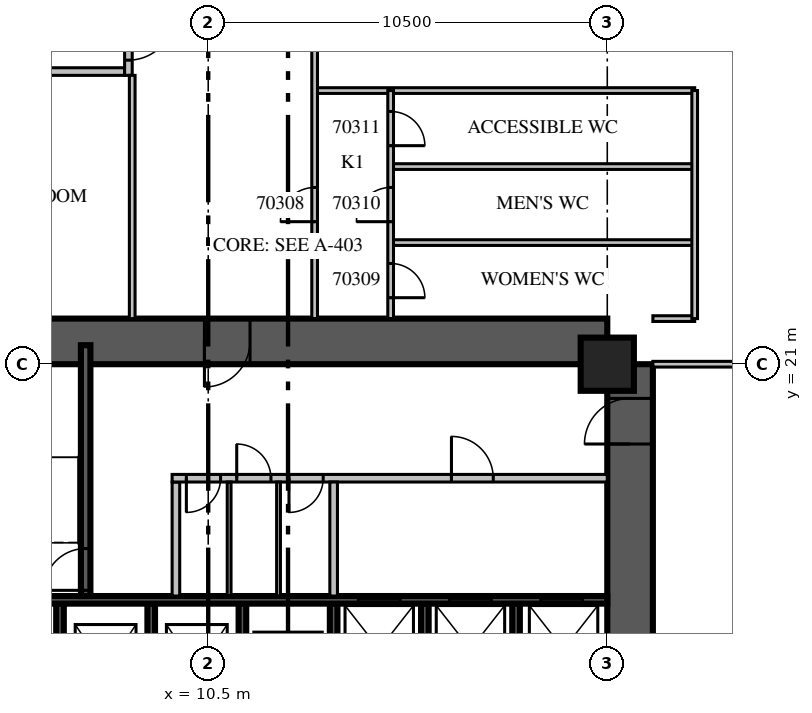
"""IFC4 building model, lengths in metres.
Left out: names, types, materials, properties, quantities, classifications, styles, units other than length and angle.
Written with IfcOpenShell. Run it as: python <this file> out.ifc"""

import sys

from ifc_helpers import new_model, si_unit, direction, frame, frame_2d, origin, origin_2d, place, context, subcontext, project, spatial, rectangle, extrude, source, transform, mapped, element, fill, save


model = new_model("IFC4")
c1 = context("Model", 3, precision=1e-05, world=origin(), true_north=direction((0.0, 1.0)))
c2 = subcontext(c1, "Body", "Model", "MODEL_VIEW")
j1 = project(units=[si_unit("LENGTHUNIT", "METRE"), si_unit("PLANEANGLEUNIT", "RADIAN")], contexts=[c1])
p1 = place(None, origin())
s1 = spatial("IfcSite", under=j1, at=p1, CompositionType="ELEMENT")
p2 = place(p1, origin())
s2 = spatial("IfcBuilding", under=s1, at=p2, CompositionType="ELEMENT")
p3 = place(p2, origin())
s3 = spatial("IfcBuildingStorey", under=s2, at=p3, CompositionType="ELEMENT", Elevation=0.0)
m1 = source(origin(), c2, "Body", "SweptSolid", [
    extrude(rectangle(XDim=1.4, YDim=1.4, at=origin_2d()), origin(), (0.0, 0.0, 1.0), 7.5),
])
p4 = place(p3, frame((21.0, 21.0, 0.0), z_axis=(0.0, 0.0, 1.0), x_axis=(1.0, 0.0, 0.0)))
e1 = element("IfcColumn", 1, at=p4, inside=s3, PredefinedType="COLUMN", context=c2, shape_type="MappedRepresentation", body=[
    mapped(m1, transform((0.0, 0.0, 0.0), scale=1.0)),
])
p5 = place(p3, frame((21.6, 4.2, 0.0), z_axis=(0.0, 0.0, 1.0), x_axis=(0.0, 1.0, 0.0)))
e2 = element("IfcWall", 2, at=p5, inside=s3, PredefinedType="SHEAR", context=c2, shape_type="SweptSolid", body=[
    extrude(rectangle(XDim=16.8, YDim=1.2, at=frame_2d((8.4, 0.0))), origin(), (0.0, 0.0, 1.0), 7.5),
])
m2 = source(origin(), c2, "Body", "SweptSolid", [
    extrude(rectangle(XDim=2.2, YDim=2.1, at=frame_2d((1.1, 1.05))), frame((0.0, 0.61, 0.0), z_axis=(0.0, -1.0, 0.0), x_axis=(1.0, 0.0, 0.0)), (0.0, 0.0, 1.0), 1.22),
])
p6 = place(p5, frame((4.2, 0.0, 0.0)))
e3 = element("IfcOpeningElement", 3, at=p6, cuts=e2, PredefinedType="OPENING", context=c2, shape_type="MappedRepresentation", body=[
    mapped(m2, transform((0.0, 0.0, 0.0), scale=1.0)),
])
m3 = source(origin(), c2, "Body", "SweptSolid", [
    extrude(rectangle(XDim=1.2, YDim=2.1, at=frame_2d((0.6, 1.05))), frame((0.0, 0.61, 0.0), z_axis=(0.0, -1.0, 0.0), x_axis=(1.0, 0.0, 0.0)), (0.0, 0.0, 1.0), 1.22),
])
p7 = place(p5, frame((14.7, 0.0, 0.0)))
e4 = element("IfcOpeningElement", 4, at=p7, cuts=e2, PredefinedType="OPENING", context=c2, shape_type="MappedRepresentation", body=[
    mapped(m3, transform((0.0, 0.0, 0.0), scale=1.0)),
])
m4 = source(origin(), c2, "Body", "SweptSolid", [
    extrude(rectangle(XDim=16.8, YDim=1.2, at=frame_2d((8.4, 0.0))), origin(), (0.0, 0.0, 1.0), 7.5),
])
p8 = place(p3, frame((4.2, 21.6, 0.0), z_axis=(0.0, 0.0, 1.0), x_axis=(1.0, 0.0, 0.0)))
e5 = element("IfcWall", 5, at=p8, inside=s3, PredefinedType="SHEAR", context=c2, shape_type="MappedRepresentation", body=[
    mapped(m4, transform((0.0, 0.0, 0.0), scale=1.0)),
])
p9 = place(p8, frame((6.2, 0.0, 0.0)))
e6 = element("IfcOpeningElement", 6, at=p9, cuts=e5, PredefinedType="OPENING", context=c2, shape_type="MappedRepresentation", body=[
    mapped(m3, transform((0.0, 0.0, 0.0), scale=1.0)),
])
p10 = place(p3, frame((6.6, 11.7, 0.0), z_axis=(0.0, 0.0, 1.0), x_axis=(0.0, 1.0, 0.0)))
e7 = element("IfcWall", 7, at=p10, inside=s3, PredefinedType="SOLIDWALL", context=c2, shape_type="SweptSolid", body=[
    extrude(rectangle(XDim=3.0, YDim=0.2, at=frame_2d((1.5, 0.0))), origin(), (0.0, 0.0, 1.0), 7.5),
])
m5 = source(origin(), c2, "Body", "SweptSolid", [
    extrude(rectangle(XDim=3.0, YDim=0.2, at=frame_2d((1.5, 0.0))), origin(), (0.0, 0.0, 1.0), 7.5),
])
for number, where, z_axis, x_axis in (
    (8, (9.0, 11.7, 0.0), (0.0, 0.0, 1.0), (0.0, 1.0, 0.0)),
    (9, (11.4, 11.7, 0.0), (0.0, 0.0, 1.0), (0.0, 1.0, 0.0)),
    (10, (13.8, 11.7, 0.0), (0.0, 0.0, 1.0), (0.0, 1.0, 0.0)),
    (11, (16.2, 11.7, 0.0), (0.0, 0.0, 1.0), (0.0, 1.0, 0.0)),
    (12, (18.6, 11.7, 0.0), (0.0, 0.0, 1.0), (0.0, 1.0, 0.0)),
):
    element("IfcWall", number, at=place(p3, frame(where, z_axis=z_axis, x_axis=x_axis)), inside=s3, PredefinedType="SOLIDWALL", context=c2, shape_type="MappedRepresentation", body=[
        mapped(m5, transform((0.0, 0.0, 0.0), scale=1.0)),
    ])
m6 = source(origin(), c2, "Body", "SweptSolid", [
    extrude(rectangle(XDim=16.8, YDim=0.2, at=frame_2d((8.4, 0.0))), origin(), (0.0, 0.0, 1.0), 7.5),
])
p11 = place(p3, frame((4.2, 14.8, 0.0), z_axis=(0.0, 0.0, 1.0), x_axis=(1.0, 0.0, 0.0)))
e13 = element("IfcWall", 13, at=p11, inside=s3, PredefinedType="SOLIDWALL", context=c2, shape_type="MappedRepresentation", body=[
    mapped(m6, transform((0.0, 0.0, 0.0), scale=1.0)),
])
m7 = source(origin(), c2, "Body", "SweptSolid", [
    extrude(rectangle(XDim=1.1, YDim=2.1, at=frame_2d((0.55, 1.05))), frame((0.0, 0.11, 0.0), z_axis=(0.0, -1.0, 0.0), x_axis=(1.0, 0.0, 0.0)), (0.0, 0.0, 1.0), 0.22),
])
p12 = place(p11, frame((10.25, 0.0, 0.0)))
e14 = element("IfcOpeningElement", 14, at=p12, cuts=e13, PredefinedType="OPENING", context=c2, shape_type="MappedRepresentation", body=[
    mapped(m7, transform((0.0, 0.0, 0.0), scale=1.0)),
])
p13 = place(p11, frame((12.65, 0.0, 0.0)))
e15 = element("IfcOpeningElement", 15, at=p13, cuts=e13, PredefinedType="OPENING", context=c2, shape_type="MappedRepresentation", body=[
    mapped(m7, transform((0.0, 0.0, 0.0), scale=1.0)),
])
p14 = place(p11, frame((15.05, 0.0, 0.0)))
e16 = element("IfcOpeningElement", 16, at=p14, cuts=e13, PredefinedType="OPENING", context=c2, shape_type="MappedRepresentation", body=[
    mapped(m7, transform((0.0, 0.0, 0.0), scale=1.0)),
])
p15 = place(p3, frame((7.275, 14.9, 0.0), z_axis=(0.0, 0.0, 1.0), x_axis=(0.0, 1.0, 0.0)))
e17 = element("IfcWall", 17, at=p15, inside=s3, PredefinedType="SOLIDWALL", context=c2, shape_type="SweptSolid", body=[
    extrude(rectangle(XDim=6.6, YDim=0.25, at=frame_2d((3.3, 0.0))), origin(), (0.0, 0.0, 1.0), 6.9),
])
m8 = source(origin(), c2, "Body", "SweptSolid", [
    extrude(rectangle(XDim=1.1, YDim=2.1, at=frame_2d((0.55, 1.05))), frame((0.0, 0.135, 0.0), z_axis=(0.0, -1.0, 0.0), x_axis=(1.0, 0.0, 0.0)), (0.0, 0.0, 1.0), 0.27),
])
p16 = place(p15, frame((0.15, 0.0, 0.0)))
e18 = element("IfcOpeningElement", 18, at=p16, cuts=e17, PredefinedType="OPENING", context=c2, shape_type="MappedRepresentation", body=[
    mapped(m8, transform((0.0, 0.0, 0.0), scale=1.0)),
])
p17 = place(p3, frame((9.65, 14.9, 0.0), z_axis=(0.0, 0.0, 1.0), x_axis=(0.0, 1.0, 0.0)))
e19 = element("IfcWall", 19, at=p17, inside=s3, PredefinedType="PARTITIONING", context=c2, shape_type="SweptSolid", body=[
    extrude(rectangle(XDim=3.0, YDim=0.2, at=frame_2d((1.5, 0.0))), origin(), (0.0, 0.0, 1.0), 6.9),
])
p18 = place(p3, frame((9.55, 18.0, 0.0), z_axis=(0.0, 0.0, 1.0), x_axis=(1.0, 0.0, 0.0)))
e20 = element("IfcWall", 20, at=p18, inside=s3, PredefinedType="PARTITIONING", context=c2, shape_type="SweptSolid", body=[
    extrude(rectangle(XDim=11.45, YDim=0.2, at=frame_2d((5.725, 0.0))), origin(), (0.0, 0.0, 1.0), 6.9),
])
m9 = source(origin(), c2, "Body", "SweptSolid", [
    extrude(rectangle(XDim=0.9, YDim=2.1, at=frame_2d((0.45, 1.05))), frame((0.0, 0.11, 0.0), z_axis=(0.0, -1.0, 0.0), x_axis=(1.0, 0.0, 0.0)), (0.0, 0.0, 1.0), 0.22),
])
p19 = place(p18, frame((0.375, 0.0, 0.0)))
e21 = element("IfcOpeningElement", 21, at=p19, cuts=e20, PredefinedType="OPENING", context=c2, shape_type="MappedRepresentation", body=[
    mapped(m9, transform((0.0, 0.0, 0.0), scale=1.0)),
])
p20 = place(p18, frame((1.7, 0.0, 0.0)))
e22 = element("IfcOpeningElement", 22, at=p20, cuts=e20, PredefinedType="OPENING", context=c2, shape_type="MappedRepresentation", body=[
    mapped(m9, transform((0.0, 0.0, 0.0), scale=1.0)),
])
p21 = place(p18, frame((3.075, 0.0, 0.0)))
e23 = element("IfcOpeningElement", 23, at=p21, cuts=e20, PredefinedType="OPENING", context=c2, shape_type="MappedRepresentation", body=[
    mapped(m9, transform((0.0, 0.0, 0.0), scale=1.0)),
])
p22 = place(p18, frame((7.35, 0.0, 0.0)))
e24 = element("IfcOpeningElement", 24, at=p22, cuts=e20, PredefinedType="OPENING", context=c2, shape_type="MappedRepresentation", body=[
    mapped(m7, transform((0.0, 0.0, 0.0), scale=1.0)),
])
m10 = source(origin(), c2, "Body", "SweptSolid", [
    extrude(rectangle(XDim=3.0, YDim=0.2, at=frame_2d((1.5, 0.0))), origin(), (0.0, 0.0, 1.0), 6.9),
])
p23 = place(p3, frame((13.8, 14.9, 0.0), z_axis=(0.0, 0.0, 1.0), x_axis=(0.0, 1.0, 0.0)))
e25 = element("IfcWall", 25, at=p23, inside=s3, PredefinedType="PARTITIONING", context=c2, shape_type="MappedRepresentation", body=[
    mapped(m10, transform((0.0, 0.0, 0.0), scale=1.0)),
])
p24 = place(p3, frame((11.05, 14.9, 0.0), z_axis=(0.0, 0.0, 1.0), x_axis=(0.0, 1.0, 0.0)))
e26 = element("IfcWall", 26, at=p24, inside=s3, PredefinedType="PARTITIONING", context=c2, shape_type="SweptSolid", body=[
    extrude(rectangle(XDim=3.0, YDim=0.1, at=frame_2d((1.5, 0.0))), origin(), (0.0, 0.0, 1.0), 6.9),
])
m11 = source(origin(), c2, "Body", "SweptSolid", [
    extrude(rectangle(XDim=3.0, YDim=0.1, at=frame_2d((1.5, 0.0))), origin(), (0.0, 0.0, 1.0), 6.9),
])
p25 = place(p3, frame((12.35, 14.9, 0.0), z_axis=(0.0, 0.0, 1.0), x_axis=(0.0, 1.0, 0.0)))
e27 = element("IfcWall", 27, at=p25, inside=s3, PredefinedType="PARTITIONING", context=c2, shape_type="MappedRepresentation", body=[
    mapped(m11, transform((0.0, 0.0, 0.0), scale=1.0)),
])
m12 = source(origin(), c2, "Body", "SweptSolid", [
    extrude(rectangle(XDim=8.0, YDim=0.2, at=frame_2d((4.0, 0.0))), origin(), (0.0, 0.0, 1.0), 6.9),
])
p26 = place(p3, frame((0.3, 28.7, 0.0), z_axis=(0.0, 0.0, 1.0), x_axis=(1.0, 0.0, 0.0)))
e28 = element("IfcWall", 28, at=p26, inside=s3, PredefinedType="PARTITIONING", context=c2, shape_type="MappedRepresentation", body=[
    mapped(m12, transform((0.0, 0.0, 0.0), scale=1.0)),
])
m13 = source(origin(), c2, "Body", "SweptSolid", [
    extrude(rectangle(XDim=5.45, YDim=0.2, at=frame_2d((2.725, 0.0))), origin(), (0.0, 0.0, 1.0), 6.9),
])
p27 = place(p3, frame((8.4, 34.05, 0.0), z_axis=(0.0, 0.0, 1.0), x_axis=(0.0, -1.0, 0.0)))
e29 = element("IfcWall", 29, at=p27, inside=s3, PredefinedType="PARTITIONING", context=c2, shape_type="MappedRepresentation", body=[
    mapped(m13, transform((0.0, 0.0, 0.0), scale=1.0)),
])
m14 = source(origin(), c2, "Body", "SweptSolid", [
    extrude(rectangle(XDim=1.2, YDim=2.1, at=frame_2d((0.6, 1.05))), frame((0.0, 0.11, 0.0), z_axis=(0.0, -1.0, 0.0), x_axis=(1.0, 0.0, 0.0)), (0.0, 0.0, 1.0), 0.22),
])
p28 = place(p27, frame((3.85, 0.0, 0.0)))
e30 = element("IfcOpeningElement", 30, at=p28, cuts=e29, PredefinedType="OPENING", context=c2, shape_type="MappedRepresentation", body=[
    mapped(m14, transform((0.0, 0.0, 0.0), scale=1.0)),
])
p29 = place(p27, frame((1.3, 0.0, 0.0)))
e31 = element("IfcOpeningElement", 31, at=p29, cuts=e29, PredefinedType="OPENING", context=c2, shape_type="MappedRepresentation", body=[
    mapped(m9, transform((0.0, 0.0, 0.0), scale=1.0)),
])
p30 = place(p3, frame((22.2, 21.0, 0.0), z_axis=(0.0, 0.0, 1.0), x_axis=(1.0, 0.0, 0.0)))
e32 = element("IfcWall", 32, at=p30, inside=s3, PredefinedType="PARTITIONING", context=c2, shape_type="SweptSolid", body=[
    extrude(rectangle(XDim=16.2, YDim=0.15, at=frame_2d((8.1, 0.0))), origin(), (0.0, 0.0, 1.0), 6.9),
])
p31 = place(p3, frame((22.2, 22.2, 0.0), z_axis=(0.0, 0.0, 1.0), x_axis=(1.0, 0.0, 0.0)))
e33 = element("IfcWall", 33, at=p31, inside=s3, PredefinedType="PARTITIONING", context=c2, shape_type="SweptSolid", body=[
    extrude(rectangle(XDim=1.1, YDim=0.15, at=frame_2d((0.55, 0.0))), origin(), (0.0, 0.0, 1.0), 6.9),
])
p32 = place(p3, frame((15.3, 24.2, 0.0), z_axis=(0.0, 0.0, 1.0), x_axis=(1.0, 0.0, 0.0)))
e34 = element("IfcWall", 34, at=p32, inside=s3, PredefinedType="PARTITIONING", context=c2, shape_type="SweptSolid", body=[
    extrude(rectangle(XDim=8.0, YDim=0.15, at=frame_2d((4.0, 0.0))), origin(), (0.0, 0.0, 1.0), 6.9),
])
m15 = source(origin(), c2, "Body", "SweptSolid", [
    extrude(rectangle(XDim=8.0, YDim=0.15, at=frame_2d((4.0, 0.0))), origin(), (0.0, 0.0, 1.0), 6.9),
])
p33 = place(p3, frame((15.3, 26.2, 0.0), z_axis=(0.0, 0.0, 1.0), x_axis=(1.0, 0.0, 0.0)))
e35 = element("IfcWall", 35, at=p33, inside=s3, PredefinedType="PARTITIONING", context=c2, shape_type="MappedRepresentation", body=[
    mapped(m15, transform((0.0, 0.0, 0.0), scale=1.0)),
])
p34 = place(p3, frame((13.3, 28.2, 0.0), z_axis=(0.0, 0.0, 1.0), x_axis=(1.0, 0.0, 0.0)))
e36 = element("IfcWall", 36, at=p34, inside=s3, PredefinedType="PARTITIONING", context=c2, shape_type="SweptSolid", body=[
    extrude(rectangle(XDim=10.0, YDim=0.15, at=frame_2d((5.0, 0.0))), origin(), (0.0, 0.0, 1.0), 6.9),
])
m16 = source(origin(), c2, "Body", "SweptSolid", [
    extrude(rectangle(XDim=6.4, YDim=0.15, at=frame_2d((3.2, 0.0))), origin(), (0.0, 0.0, 1.0), 6.9),
])
p35 = place(p3, frame((8.5, 22.2, 0.0), z_axis=(0.0, 0.0, 1.0), x_axis=(0.0, 1.0, 0.0)))
e37 = element("IfcWall", 37, at=p35, inside=s3, PredefinedType="PARTITIONING", context=c2, shape_type="MappedRepresentation", body=[
    mapped(m16, transform((0.0, 0.0, 0.0), scale=1.0)),
])
p36 = place(p3, frame((13.3, 22.2, 0.0), z_axis=(0.0, 0.0, 1.0), x_axis=(0.0, 1.0, 0.0)))
e38 = element("IfcWall", 38, at=p36, inside=s3, PredefinedType="PARTITIONING", context=c2, shape_type="SweptSolid", body=[
    extrude(rectangle(XDim=20.3, YDim=0.15, at=frame_2d((10.15, 0.0))), origin(), (0.0, 0.0, 1.0), 6.9),
])
m17 = source(origin(), c2, "Body", "SweptSolid", [
    extrude(rectangle(XDim=0.9, YDim=2.1, at=frame_2d((0.45, 1.05))), frame((0.0, 0.085, 0.0), z_axis=(0.0, -1.0, 0.0), x_axis=(1.0, 0.0, 0.0)), (0.0, 0.0, 1.0), 0.17),
])
p37 = place(p36, frame((2.55, 0.0, 0.0)))
e39 = element("IfcOpeningElement", 39, at=p37, cuts=e38, PredefinedType="OPENING", context=c2, shape_type="MappedRepresentation", body=[
    mapped(m17, transform((0.0, 0.0, 0.0), scale=1.0)),
])
p38 = place(p3, frame((15.3, 22.2, 0.0), z_axis=(0.0, 0.0, 1.0), x_axis=(0.0, 1.0, 0.0)))
e40 = element("IfcWall", 40, at=p38, inside=s3, PredefinedType="PARTITIONING", context=c2, shape_type="SweptSolid", body=[
    extrude(rectangle(XDim=6.0, YDim=0.15, at=frame_2d((3.0, 0.0))), origin(), (0.0, 0.0, 1.0), 6.9),
])
p39 = place(p38, frame((0.55, 0.0, 0.0)))
e41 = element("IfcOpeningElement", 41, at=p39, cuts=e40, PredefinedType="OPENING", context=c2, shape_type="MappedRepresentation", body=[
    mapped(m17, transform((0.0, 0.0, 0.0), scale=1.0)),
])
p40 = place(p38, frame((2.55, 0.0, 0.0)))
e42 = element("IfcOpeningElement", 42, at=p40, cuts=e40, PredefinedType="OPENING", context=c2, shape_type="MappedRepresentation", body=[
    mapped(m17, transform((0.0, 0.0, 0.0), scale=1.0)),
])
p41 = place(p38, frame((4.55, 0.0, 0.0)))
e43 = element("IfcOpeningElement", 43, at=p41, cuts=e40, PredefinedType="OPENING", context=c2, shape_type="MappedRepresentation", body=[
    mapped(m17, transform((0.0, 0.0, 0.0), scale=1.0)),
])
m18 = source(origin(), c2, "Body", "SweptSolid", [
    extrude(rectangle(XDim=6.0, YDim=0.15, at=frame_2d((3.0, 0.0))), origin(), (0.0, 0.0, 1.0), 6.9),
])
p42 = place(p3, frame((23.3, 22.2, 0.0), z_axis=(0.0, 0.0, 1.0), x_axis=(0.0, 1.0, 0.0)))
e44 = element("IfcWall", 44, at=p42, inside=s3, PredefinedType="PARTITIONING", context=c2, shape_type="MappedRepresentation", body=[
    mapped(m18, transform((0.0, 0.0, 0.0), scale=1.0)),
])
m19 = source(origin(), c2, "Body", "SweptSolid", [
    extrude(rectangle(XDim=1.1, YDim=2.1, at=frame_2d((0.55, 1.05))), frame((0.0, 0.025, 0.0), z_axis=(0.0, -1.0, 0.0), x_axis=(1.0, 0.0, 0.0)), (0.0, 0.0, 1.0), 0.05),
])
p43 = place(p12, origin())
e45 = element("IfcDoor", 45, at=p43, inside=s3, OperationType="SLIDING_TO_LEFT", PredefinedType="DOOR", context=c2, shape_type="MappedRepresentation", body=[
    mapped(m19, transform((0.0, 0.0, 0.0), scale=1.0)),
])
fill(e14, e45)
p44 = place(p13, origin())
e46 = element("IfcDoor", 46, at=p44, inside=s3, OperationType="SLIDING_TO_LEFT", PredefinedType="DOOR", context=c2, shape_type="MappedRepresentation", body=[
    mapped(m19, transform((0.0, 0.0, 0.0), scale=1.0)),
])
fill(e15, e46)
p45 = place(p14, origin())
e47 = element("IfcDoor", 47, at=p45, inside=s3, OperationType="SLIDING_TO_LEFT", PredefinedType="DOOR", context=c2, shape_type="MappedRepresentation", body=[
    mapped(m19, transform((0.0, 0.0, 0.0), scale=1.0)),
])
fill(e16, e47)
p46 = place(p16, origin())
e48 = element("IfcDoor", 48, at=p46, inside=s3, OperationType="SINGLE_SWING_LEFT", PredefinedType="DOOR", context=c2, shape_type="MappedRepresentation", body=[
    mapped(m19, transform((0.0, 0.0, 0.0), scale=1.0)),
])
fill(e18, e48)
m20 = source(origin(), c2, "Body", "SweptSolid", [
    extrude(rectangle(XDim=0.9, YDim=2.1, at=frame_2d((0.45, 1.05))), frame((0.0, 0.025, 0.0), z_axis=(0.0, -1.0, 0.0), x_axis=(1.0, 0.0, 0.0)), (0.0, 0.0, 1.0), 0.05),
])
p47 = place(p19, origin())
e49 = element("IfcDoor", 49, at=p47, inside=s3, OperationType="SINGLE_SWING_RIGHT", PredefinedType="DOOR", context=c2, shape_type="MappedRepresentation", body=[
    mapped(m20, transform((0.0, 0.0, 0.0), scale=1.0)),
])
fill(e21, e49)
p48 = place(p20, origin())
e50 = element("IfcDoor", 50, at=p48, inside=s3, OperationType="SINGLE_SWING_LEFT", PredefinedType="DOOR", context=c2, shape_type="MappedRepresentation", body=[
    mapped(m20, transform((0.0, 0.0, 0.0), scale=1.0)),
])
fill(e22, e50)
p49 = place(p21, origin())
e51 = element("IfcDoor", 51, at=p49, inside=s3, OperationType="SINGLE_SWING_RIGHT", PredefinedType="DOOR", context=c2, shape_type="MappedRepresentation", body=[
    mapped(m20, transform((0.0, 0.0, 0.0), scale=1.0)),
])
fill(e23, e51)
p50 = place(p22, origin())
e52 = element("IfcDoor", 52, at=p50, inside=s3, OperationType="SINGLE_SWING_LEFT", PredefinedType="DOOR", context=c2, shape_type="MappedRepresentation", body=[
    mapped(m19, transform((0.0, 0.0, 0.0), scale=1.0)),
])
fill(e24, e52)
m21 = source(origin(), c2, "Body", "SweptSolid", [
    extrude(rectangle(XDim=1.2, YDim=2.1, at=frame_2d((0.6, 1.05))), frame((0.0, 0.025, 0.0), z_axis=(0.0, -1.0, 0.0), x_axis=(1.0, 0.0, 0.0)), (0.0, 0.0, 1.0), 0.05),
])
p51 = place(p28, origin())
e53 = element("IfcDoor", 53, at=p51, inside=s3, OperationType="SINGLE_SWING_LEFT", PredefinedType="DOOR", context=c2, shape_type="MappedRepresentation", body=[
    mapped(m21, transform((0.0, 0.0, 0.0), scale=1.0)),
])
fill(e30, e53)
p52 = place(p9, origin())
e54 = element("IfcDoor", 54, at=p52, inside=s3, OperationType="SINGLE_SWING_RIGHT", PredefinedType="DOOR", context=c2, shape_type="MappedRepresentation", body=[
    mapped(m21, transform((0.0, 0.0, 0.0), scale=1.0)),
])
fill(e6, e54)
p53 = place(p7, origin())
e55 = element("IfcDoor", 55, at=p53, inside=s3, OperationType="SINGLE_SWING_LEFT", PredefinedType="DOOR", context=c2, shape_type="MappedRepresentation", body=[
    mapped(m21, transform((0.0, 0.0, 0.0), scale=1.0)),
])
fill(e4, e55)
p54 = place(p37, origin())
e56 = element("IfcDoor", 56, at=p54, inside=s3, OperationType="SINGLE_SWING_LEFT", PredefinedType="DOOR", context=c2, shape_type="MappedRepresentation", body=[
    mapped(m20, transform((0.0, 0.0, 0.0), scale=1.0)),
])
fill(e39, e56)
p55 = place(p39, origin())
e57 = element("IfcDoor", 57, at=p55, inside=s3, OperationType="SINGLE_SWING_RIGHT", PredefinedType="DOOR", context=c2, shape_type="MappedRepresentation", body=[
    mapped(m20, transform((0.0, 0.0, 0.0), scale=1.0)),
])
fill(e41, e57)
p56 = place(p40, origin())
e58 = element("IfcDoor", 58, at=p56, inside=s3, OperationType="SINGLE_SWING_LEFT", PredefinedType="DOOR", context=c2, shape_type="MappedRepresentation", body=[
    mapped(m20, transform((0.0, 0.0, 0.0), scale=1.0)),
])
fill(e42, e58)
p57 = place(p41, origin())
e59 = element("IfcDoor", 59, at=p57, inside=s3, OperationType="SINGLE_SWING_RIGHT", PredefinedType="DOOR", context=c2, shape_type="MappedRepresentation", body=[
    mapped(m20, transform((0.0, 0.0, 0.0), scale=1.0)),
])
fill(e43, e59)
save(model, sys.argv[1])
